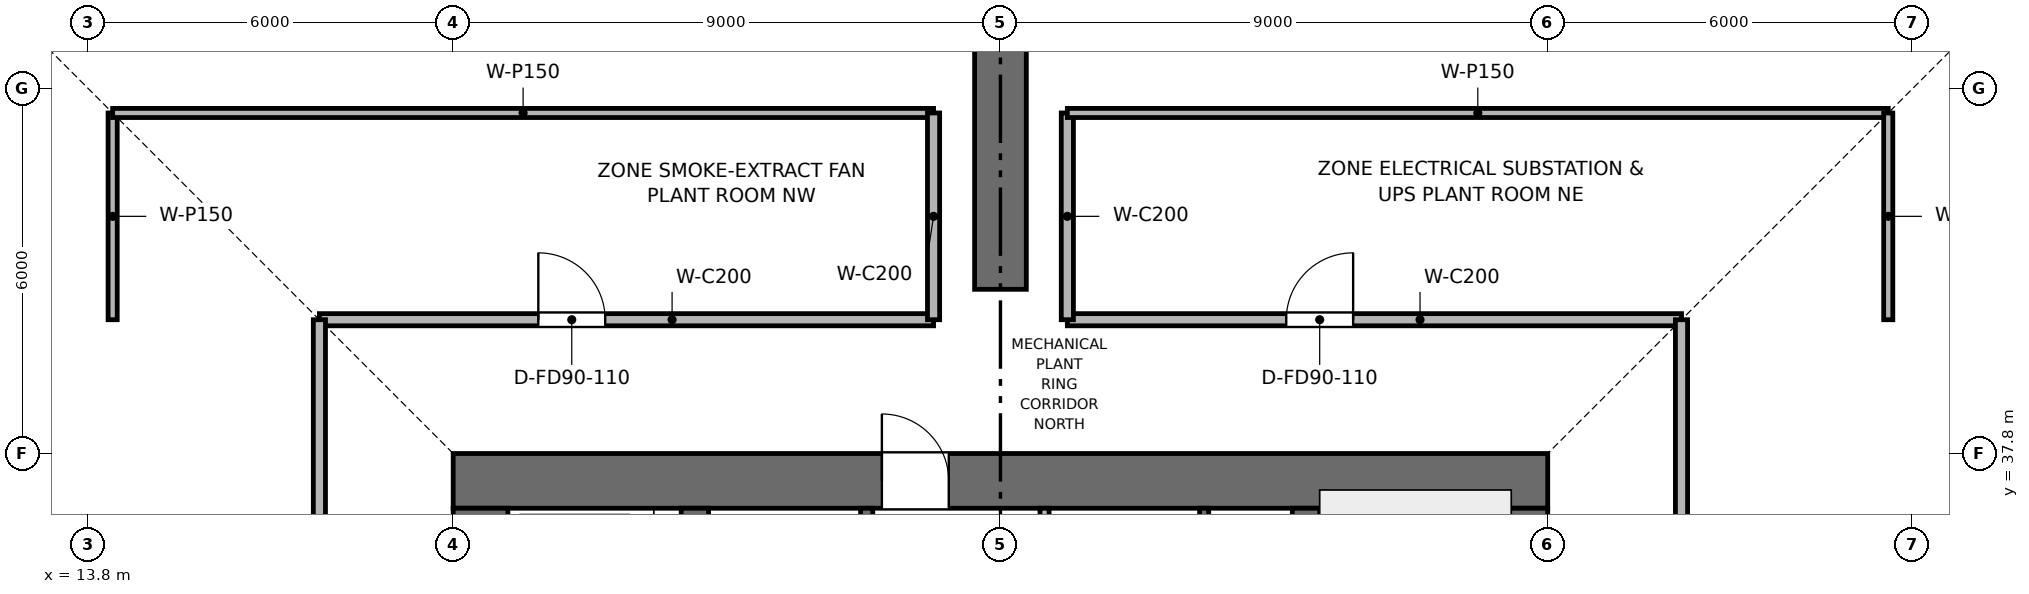
"""IFC4 building model, lengths in metres.
Left out: names, types, materials, properties, quantities, classifications, styles, units other than length and angle.
Written with IfcOpenShell. Run it as: python <this file> out.ifc"""

import sys

from ifc_helpers import new_model, si_unit, direction, frame, frame_2d, origin, place, context, subcontext, project, spatial, rectangle, extrude, element, fill, save


model = new_model("IFC4")
c1 = context("Model", 3, precision=1e-05, world=origin(), true_north=direction((0.0, 1.0)))
c2 = subcontext(c1, "Body", "Model", "MODEL_VIEW")
j1 = project(units=[si_unit("LENGTHUNIT", "METRE"), si_unit("PLANEANGLEUNIT", "RADIAN")], contexts=[c1])
p1 = place(None, origin())
s1 = spatial("IfcSite", under=j1, at=p1, CompositionType="ELEMENT")
p2 = place(p1, origin())
s2 = spatial("IfcBuilding", under=s1, at=p2, CompositionType="ELEMENT")
p3 = place(p2, frame((0.0, 0.0, 108.0)))
s3 = spatial("IfcBuildingStorey", under=s2, at=p3, CompositionType="ELEMENT", Elevation=108.0)
p4 = place(p3, frame((19.8, 37.35, 0.0), z_axis=(0.0, 0.0, 1.0), x_axis=(1.0, 0.0, 0.0)))
e1 = element("IfcWall", 1, at=p4, inside=s3, PredefinedType="SHEAR", context=c2, shape_type="SweptSolid", body=[
    extrude(rectangle(XDim=18.0, YDim=0.9, at=frame_2d((9.0, 0.0))), origin(), (0.0, 0.0, 1.0), 5.4),
])
p5 = place(p4, frame((7.05, 0.0, 0.0)))
e2 = element("IfcOpeningElement", 2, at=p5, cuts=e1, PredefinedType="OPENING", context=c2, shape_type="SweptSolid", body=[
    extrude(rectangle(XDim=1.1, YDim=2.15, at=frame_2d((0.55, 1.075))), frame((0.0, 0.46, 0.0), z_axis=(0.0, -1.0, 0.0), x_axis=(1.0, 0.0, 0.0)), (0.0, 0.0, 1.0), 0.92),
])
p6 = place(p3, frame((20.25, 20.7, 0.0), z_axis=(0.0, 0.0, 1.0), x_axis=(0.0, 1.0, 0.0)))
e3 = element("IfcWall", 3, at=p6, inside=s3, PredefinedType="SHEAR", context=c2, shape_type="SweptSolid", body=[
    extrude(rectangle(XDim=16.2, YDim=0.9, at=frame_2d((8.1, 0.0))), origin(), (0.0, 0.0, 1.0), 5.4),
])
p7 = place(p6, frame((10.1, 0.0, 0.0)))
e4 = element("IfcOpeningElement", 4, at=p7, cuts=e3, PredefinedType="OPENING", context=c2, shape_type="SweptSolid", body=[
    extrude(rectangle(XDim=1.1, YDim=2.15, at=frame_2d((0.55, 1.075))), frame((0.0, 0.46, 0.0), z_axis=(0.0, -1.0, 0.0), x_axis=(1.0, 0.0, 0.0)), (0.0, 0.0, 1.0), 0.92),
])
p8 = place(p3, frame((37.35, 20.7, 0.0), z_axis=(0.0, 0.0, 1.0), x_axis=(0.0, 1.0, 0.0)))
e5 = element("IfcWall", 5, at=p8, inside=s3, PredefinedType="SHEAR", context=c2, shape_type="SweptSolid", body=[
    extrude(rectangle(XDim=16.2, YDim=0.9, at=frame_2d((8.1, 0.0))), origin(), (0.0, 0.0, 1.0), 5.4),
])
p9 = place(p8, frame((4.6, 0.0, 0.0)))
e6 = element("IfcOpeningElement", 6, at=p9, cuts=e5, PredefinedType="OPENING", context=c2, shape_type="SweptSolid", body=[
    extrude(rectangle(XDim=1.1, YDim=2.15, at=frame_2d((0.55, 1.075))), frame((0.0, 0.46, 0.0), z_axis=(0.0, -1.0, 0.0), x_axis=(1.0, 0.0, 0.0)), (0.0, 0.0, 1.0), 0.92),
])
for number, where, z_axis, x_axis in (
    (7, (23.775, 20.7, 0.0), (0.0, 0.0, 1.0), (0.0, 1.0, 0.0)),
    (8, (33.825, 20.7, 0.0), (0.0, 0.0, 1.0), (0.0, 1.0, 0.0)),
):
    element("IfcWall", number, at=place(p3, frame(where, z_axis=z_axis, x_axis=x_axis)), inside=s3, PredefinedType="SHEAR", context=c2, shape_type="SweptSolid", body=[
        extrude(rectangle(XDim=16.2, YDim=0.45, at=frame_2d((8.1, 0.0))), origin(), (0.0, 0.0, 1.0), 5.4),
    ])
p10 = place(p3, frame((28.8, 40.5, 0.0), z_axis=(0.0, 0.0, 1.0), x_axis=(0.0, 1.0, 0.0)))
e9 = element("IfcWall", 9, at=p10, inside=s3, PredefinedType="SHEAR", context=c2, shape_type="SweptSolid", body=[
    extrude(rectangle(XDim=12.55, YDim=0.85, at=frame_2d((6.275, 0.0))), origin(), (0.0, 0.0, 1.0), 5.15),
])
p11 = place(p3, frame((32.15, 34.0, 0.0), z_axis=(0.0, 0.0, 1.0), x_axis=(0.0, 1.0, 0.0)))
e10 = element("IfcWall", 10, at=p11, inside=s3, PredefinedType="SHEAR", context=c2, shape_type="SweptSolid", body=[
    extrude(rectangle(XDim=2.9, YDim=0.15, at=frame_2d((1.45, 0.0))), origin(), (0.0, 0.0, 1.0), 5.15),
])
p12 = place(p3, frame((26.6, 34.0, 0.0), z_axis=(0.0, 0.0, 1.0), x_axis=(0.0, 1.0, 0.0)))
e11 = element("IfcWall", 11, at=p12, inside=s3, PredefinedType="SHEAR", context=c2, shape_type="SweptSolid", body=[
    extrude(rectangle(XDim=2.9, YDim=0.2, at=frame_2d((1.45, 0.0))), origin(), (0.0, 0.0, 1.0), 5.15),
])
p13 = place(p12, frame((0.75, 0.0, 0.0)))
e12 = element("IfcOpeningElement", 12, at=p13, cuts=e11, PredefinedType="OPENING", context=c2, shape_type="SweptSolid", body=[
    extrude(rectangle(XDim=1.1, YDim=2.15, at=frame_2d((0.55, 1.075))), frame((0.0, 0.11, 0.0), z_axis=(0.0, -1.0, 0.0), x_axis=(1.0, 0.0, 0.0)), (0.0, 0.0, 1.0), 0.22),
])
p14 = place(p3, frame((29.525, 33.925, 0.0), z_axis=(0.0, 0.0, 1.0), x_axis=(0.0, 1.0, 0.0)))
e13 = element("IfcWall", 13, at=p14, inside=s3, PredefinedType="PARTITIONING", context=c2, shape_type="SweptSolid", body=[
    extrude(rectangle(XDim=2.975, YDim=0.15, at=frame_2d((1.487, 0.0))), origin(), (0.0, 0.0, 1.0), 5.15),
])
p15 = place(p14, frame((0.85, 0.0, 0.0)))
e14 = element("IfcOpeningElement", 14, at=p15, cuts=e13, PredefinedType="OPENING", context=c2, shape_type="SweptSolid", body=[
    extrude(rectangle(XDim=0.9, YDim=2.1, at=frame_2d((0.45, 1.05))), frame((0.0, 0.085, 0.0), z_axis=(0.0, -1.0, 0.0), x_axis=(1.0, 0.0, 0.0)), (0.0, 0.0, 1.0), 0.17),
])
p16 = place(p3, frame((17.6, 40.0, 0.0), z_axis=(0.0, 0.0, 1.0), x_axis=(1.0, 0.0, 0.0)))
e15 = element("IfcWall", 15, at=p16, inside=s3, PredefinedType="PARTITIONING", context=c2, shape_type="SweptSolid", body=[
    extrude(rectangle(XDim=10.1, YDim=0.2, at=frame_2d((5.05, 0.0))), origin(), (0.0, 0.0, 1.0), 4.685),
])
p17 = place(p16, frame((3.6, 0.0, 0.0)))
e16 = element("IfcOpeningElement", 16, at=p17, cuts=e15, PredefinedType="OPENING", context=c2, shape_type="SweptSolid", body=[
    extrude(rectangle(XDim=1.1, YDim=2.15, at=frame_2d((0.55, 1.075))), frame((0.0, 0.11, 0.0), z_axis=(0.0, -1.0, 0.0), x_axis=(1.0, 0.0, 0.0)), (0.0, 0.0, 1.0), 0.22),
])
p18 = place(p3, frame((29.9, 40.0, 0.0), z_axis=(0.0, 0.0, 1.0), x_axis=(1.0, 0.0, 0.0)))
e17 = element("IfcWall", 17, at=p18, inside=s3, PredefinedType="PARTITIONING", context=c2, shape_type="SweptSolid", body=[
    extrude(rectangle(XDim=10.1, YDim=0.2, at=frame_2d((5.05, 0.0))), origin(), (0.0, 0.0, 1.0), 4.685),
])
p19 = place(p18, frame((3.6, 0.0, 0.0)))
e18 = element("IfcOpeningElement", 18, at=p19, cuts=e17, PredefinedType="OPENING", context=c2, shape_type="SweptSolid", body=[
    extrude(rectangle(XDim=1.1, YDim=2.15, at=frame_2d((0.55, 1.075))), frame((0.0, 0.11, 0.0), z_axis=(0.0, -1.0, 0.0), x_axis=(1.0, 0.0, 0.0)), (0.0, 0.0, 1.0), 0.22),
])
for number, where, z_axis, x_axis in (
    (19, (17.6, 29.9, 0.0), (0.0, 0.0, 1.0), (0.0, 1.0, 0.0)),
    (20, (40.0, 29.9, 0.0), (0.0, 0.0, 1.0), (0.0, 1.0, 0.0)),
):
    element("IfcWall", number, at=place(p3, frame(where, z_axis=z_axis, x_axis=x_axis)), inside=s3, PredefinedType="PARTITIONING", context=c2, shape_type="SweptSolid", body=[
        extrude(rectangle(XDim=10.1, YDim=0.2, at=frame_2d((5.05, 0.0))), origin(), (0.0, 0.0, 1.0), 4.685),
    ])
p20 = place(p3, frame((14.2, 40.0, 0.0), z_axis=(0.0, 0.0, 1.0), x_axis=(0.0, 1.0, 0.0)))
e21 = element("IfcWall", 21, at=p20, inside=s3, PredefinedType="PARTITIONING", context=c2, shape_type="SweptSolid", body=[
    extrude(rectangle(XDim=3.4, YDim=0.15, at=frame_2d((1.7, 0.0))), origin(), (0.0, 0.0, 1.0), 4.685),
])
p21 = place(p3, frame((14.2, 43.4, 0.0), z_axis=(0.0, 0.0, 1.0), x_axis=(1.0, 0.0, 0.0)))
e22 = element("IfcWall", 22, at=p21, inside=s3, PredefinedType="PARTITIONING", context=c2, shape_type="SweptSolid", body=[
    extrude(rectangle(XDim=13.5, YDim=0.15, at=frame_2d((6.75, 0.0))), origin(), (0.0, 0.0, 1.0), 4.685),
])
for number, where, z_axis, x_axis in (
    (23, (27.7, 40.0, 0.0), (0.0, 0.0, 1.0), (0.0, 1.0, 0.0)),
    (24, (29.9, 40.0, 0.0), (0.0, 0.0, 1.0), (0.0, 1.0, 0.0)),
):
    element("IfcWall", number, at=place(p3, frame(where, z_axis=z_axis, x_axis=x_axis)), inside=s3, PredefinedType="PARTITIONING", context=c2, shape_type="SweptSolid", body=[
        extrude(rectangle(XDim=3.4, YDim=0.2, at=frame_2d((1.7, 0.0))), origin(), (0.0, 0.0, 1.0), 4.775),
    ])
p22 = place(p3, frame((29.9, 43.4, 0.0), z_axis=(0.0, 0.0, 1.0), x_axis=(1.0, 0.0, 0.0)))
e25 = element("IfcWall", 25, at=p22, inside=s3, PredefinedType="PARTITIONING", context=c2, shape_type="SweptSolid", body=[
    extrude(rectangle(XDim=13.5, YDim=0.15, at=frame_2d((6.75, 0.0))), origin(), (0.0, 0.0, 1.0), 4.685),
])
p23 = place(p3, frame((43.4, 40.0, 0.0), z_axis=(0.0, 0.0, 1.0), x_axis=(0.0, 1.0, 0.0)))
e26 = element("IfcWall", 26, at=p23, inside=s3, PredefinedType="PARTITIONING", context=c2, shape_type="SweptSolid", body=[
    extrude(rectangle(XDim=3.4, YDim=0.15, at=frame_2d((1.7, 0.0))), origin(), (0.0, 0.0, 1.0), 4.685),
])
p24 = place(p17, origin())
e27 = element("IfcDoor", 27, at=p24, inside=s3, OperationType="SINGLE_SWING_LEFT", PredefinedType="DOOR", context=c2, shape_type="SweptSolid", body=[
    extrude(rectangle(XDim=1.1, YDim=2.15, at=frame_2d((0.55, 1.075))), frame((0.0, 0.025, 0.0), z_axis=(0.0, -1.0, 0.0), x_axis=(1.0, 0.0, 0.0)), (0.0, 0.0, 1.0), 0.05),
])
fill(e16, e27)
p25 = place(p19, origin())
e28 = element("IfcDoor", 28, at=p25, inside=s3, OperationType="SINGLE_SWING_RIGHT", PredefinedType="DOOR", context=c2, shape_type="SweptSolid", body=[
    extrude(rectangle(XDim=1.1, YDim=2.15, at=frame_2d((0.55, 1.075))), frame((0.0, 0.025, 0.0), z_axis=(0.0, -1.0, 0.0), x_axis=(1.0, 0.0, 0.0)), (0.0, 0.0, 1.0), 0.05),
])
fill(e18, e28)
p26 = place(p5, origin())
e29 = element("IfcDoor", 29, at=p26, inside=s3, OperationType="SINGLE_SWING_LEFT", PredefinedType="DOOR", context=c2, shape_type="SweptSolid", body=[
    extrude(rectangle(XDim=1.1, YDim=2.15, at=frame_2d((0.55, 1.075))), frame((0.0, 0.025, 0.0), z_axis=(0.0, -1.0, 0.0), x_axis=(1.0, 0.0, 0.0)), (0.0, 0.0, 1.0), 0.05),
])
fill(e2, e29)
save(model, sys.argv[1])
